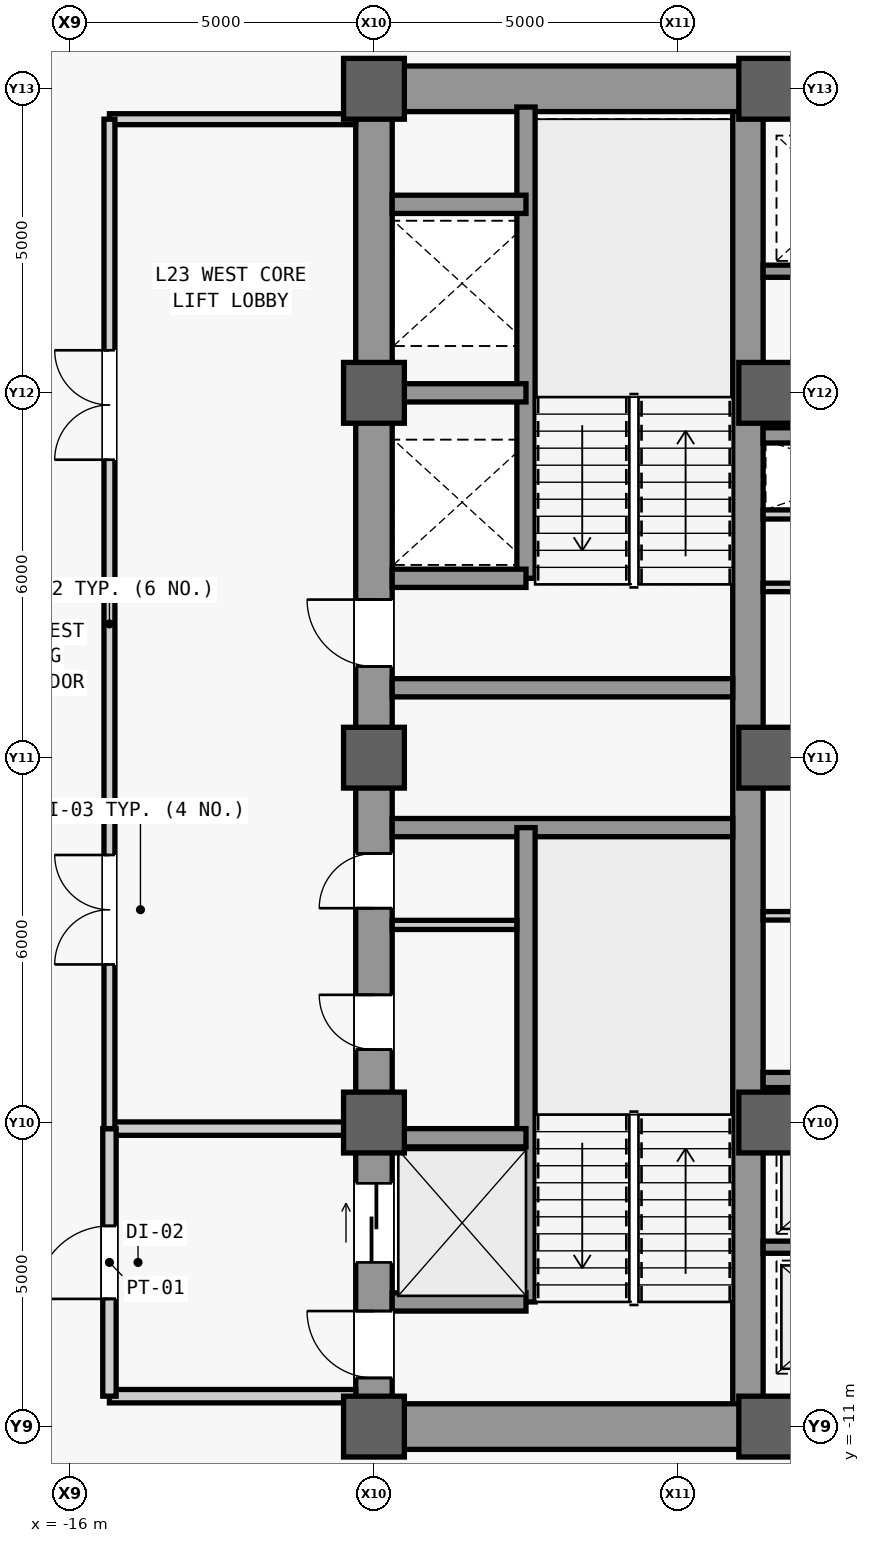
"""IFC4 building model, lengths in metres.
Left out: names, types, materials, properties, quantities, classifications, styles, units other than length and angle.
Written with IfcOpenShell. Run it as: python <this file> out.ifc"""

import sys

from ifc_helpers import new_model, si_unit, direction, frame, frame_2d, origin, origin_2d, place, context, subcontext, project, spatial, rectangle, extrude, source, transform, mapped, element, fill, save


model = new_model("IFC4")
c1 = context("Model", 3, precision=1e-05, world=origin(), true_north=direction((0.0, 1.0)))
c2 = subcontext(c1, "Body", "Model", "MODEL_VIEW")
j1 = project(units=[si_unit("LENGTHUNIT", "METRE"), si_unit("PLANEANGLEUNIT", "RADIAN")], contexts=[c1])
p1 = place(None, origin())
s1 = spatial("IfcSite", under=j1, at=p1, CompositionType="ELEMENT")
p2 = place(p1, origin())
s2 = spatial("IfcBuilding", under=s1, at=p2, CompositionType="ELEMENT")
p3 = place(p2, frame((0.0, 0.0, 103.7)))
s3 = spatial("IfcBuildingStorey", under=s2, at=p3, CompositionType="ELEMENT", Elevation=103.7)
m1 = source(origin(), c2, "Body", "SweptSolid", [
    extrude(rectangle(XDim=22.0, YDim=0.6, at=frame_2d((11.0, 0.0))), origin(), (0.0, 0.0, 1.0), 3.84),
])
p4 = place(p3, frame((-11.0, -11.0, 0.0), z_axis=(0.0, 0.0, 1.0), x_axis=(0.0, 1.0, 0.0)))
e1 = element("IfcWall", 1, at=p4, inside=s3, PredefinedType="SHEAR", context=c2, shape_type="MappedRepresentation", body=[
    mapped(m1, transform((0.0, 0.0, 0.0), scale=1.0)),
])
m2 = source(origin(), c2, "Body", "SweptSolid", [
    extrude(rectangle(XDim=1.1, YDim=2.2, at=frame_2d((0.55, 1.1))), frame((0.0, 0.31, 0.0), z_axis=(0.0, -1.0, 0.0), x_axis=(1.0, 0.0, 0.0)), (0.0, 0.0, 1.0), 0.62),
])
p5 = place(p4, frame((0.8, 0.0, 0.0)))
e2 = element("IfcOpeningElement", 2, at=p5, cuts=e1, PredefinedType="OPENING", context=c2, shape_type="MappedRepresentation", body=[
    mapped(m2, transform((0.0, 0.0, 0.0), scale=1.0)),
])
p6 = place(p4, frame((12.5, 0.0, 0.0)))
e3 = element("IfcOpeningElement", 3, at=p6, cuts=e1, PredefinedType="OPENING", context=c2, shape_type="MappedRepresentation", body=[
    mapped(m2, transform((0.0, 0.0, 0.0), scale=1.0)),
])
m3 = source(origin(), c2, "Body", "SweptSolid", [
    extrude(rectangle(XDim=0.9, YDim=2.15, at=frame_2d((0.45, 1.075))), frame((0.0, 0.31, 0.0), z_axis=(0.0, -1.0, 0.0), x_axis=(1.0, 0.0, 0.0)), (0.0, 0.0, 1.0), 0.62),
])
p7 = place(p4, frame((6.2, 0.0, 0.0)))
e4 = element("IfcOpeningElement", 4, at=p7, cuts=e1, PredefinedType="OPENING", context=c2, shape_type="MappedRepresentation", body=[
    mapped(m3, transform((0.0, 0.0, 0.0), scale=1.0)),
])
p8 = place(p4, frame((8.525, 0.0, 0.0)))
e5 = element("IfcOpeningElement", 5, at=p8, cuts=e1, PredefinedType="OPENING", context=c2, shape_type="MappedRepresentation", body=[
    mapped(m3, transform((0.0, 0.0, 0.0), scale=1.0)),
])
m4 = source(origin(), c2, "Body", "SweptSolid", [
    extrude(rectangle(XDim=1.3, YDim=2.3, at=frame_2d((0.65, 1.15))), frame((0.0, 0.31, 0.0), z_axis=(0.0, -1.0, 0.0), x_axis=(1.0, 0.0, 0.0)), (0.0, 0.0, 1.0), 0.62),
])
p9 = place(p4, frame((2.7, 0.0, 0.0)))
e6 = element("IfcOpeningElement", 6, at=p9, cuts=e1, PredefinedType="OPENING", context=c2, shape_type="MappedRepresentation", body=[
    mapped(m4, transform((0.0, 0.0, 0.0), scale=1.0)),
])
m5 = source(origin(), c2, "Body", "SweptSolid", [
    extrude(rectangle(XDim=21.4, YDim=0.5, at=frame_2d((10.7, 0.0))), origin(), (0.0, 0.0, 1.0), 3.84),
])
p10 = place(p3, frame((-4.85, -10.7, 0.0), z_axis=(0.0, 0.0, 1.0), x_axis=(0.0, 1.0, 0.0)))
e7 = element("IfcWall", 7, at=p10, inside=s3, PredefinedType="SHEAR", context=c2, shape_type="MappedRepresentation", body=[
    mapped(m5, transform((0.0, 0.0, 0.0), scale=1.0)),
])
m6 = source(origin(), c2, "Body", "SweptSolid", [
    extrude(rectangle(XDim=5.85, YDim=0.75, at=frame_2d((2.925, 0.0))), origin(), (0.0, 0.0, 1.0), 3.84),
])
for number, where, z_axis, x_axis in (
    (8, (-10.7, -11.0, 0.0), (0.0, 0.0, 1.0), (1.0, 0.0, 0.0)),
    (9, (-10.7, 11.0, 0.0), (0.0, 0.0, 1.0), (1.0, 0.0, 0.0)),
):
    element("IfcWall", number, at=place(p3, frame(where, z_axis=z_axis, x_axis=x_axis)), inside=s3, PredefinedType="SHEAR", context=c2, shape_type="MappedRepresentation", body=[
        mapped(m6, transform((0.0, 0.0, 0.0), scale=1.0)),
    ])
m7 = source(origin(), c2, "Body", "SweptSolid", [
    extrude(rectangle(XDim=5.6, YDim=0.3, at=frame_2d((2.8, 0.0))), origin(), (0.0, 0.0, 1.0), 3.84),
])
for number, where, z_axis, x_axis in (
    (10, (-10.7, -1.15, 0.0), (0.0, 0.0, 1.0), (1.0, 0.0, 0.0)),
    (11, (-10.7, 1.15, 0.0), (0.0, 0.0, 1.0), (1.0, 0.0, 0.0)),
):
    element("IfcWall", number, at=place(p3, frame(where, z_axis=z_axis, x_axis=x_axis)), inside=s3, PredefinedType="SHEAR", context=c2, shape_type="MappedRepresentation", body=[
        mapped(m7, transform((0.0, 0.0, 0.0), scale=1.0)),
    ])
m8 = source(origin(), c2, "Body", "SweptSolid", [
    extrude(rectangle(XDim=9.2, YDim=0.5, at=frame_2d((4.6, 0.0))), origin(), (0.0, 0.0, 1.0), 3.84),
])
p11 = place(p3, frame((-4.6, -11.0, 0.0), z_axis=(0.0, 0.0, 1.0), x_axis=(1.0, 0.0, 0.0)))
e12 = element("IfcWall", 12, at=p11, inside=s3, PredefinedType="SHEAR", context=c2, shape_type="MappedRepresentation", body=[
    mapped(m8, transform((0.0, 0.0, 0.0), scale=1.0)),
])
m9 = source(origin(), c2, "Body", "SweptSolid", [
    extrude(rectangle(XDim=1.8, YDim=2.25, at=frame_2d((0.9, 1.125))), frame((0.0, 0.26, 0.0), z_axis=(0.0, -1.0, 0.0), x_axis=(1.0, 0.0, 0.0)), (0.0, 0.0, 1.0), 0.52),
])
p12 = place(p11, frame((3.7, 0.0, 0.0)))
e13 = element("IfcOpeningElement", 13, at=p12, cuts=e12, PredefinedType="OPENING", context=c2, shape_type="MappedRepresentation", body=[
    mapped(m9, transform((0.0, 0.0, 0.0), scale=1.0)),
])
p13 = place(p3, frame((-4.6, 11.0, 0.0), z_axis=(0.0, 0.0, 1.0), x_axis=(1.0, 0.0, 0.0)))
e14 = element("IfcWall", 14, at=p13, inside=s3, PredefinedType="SHEAR", context=c2, shape_type="MappedRepresentation", body=[
    mapped(m8, transform((0.0, 0.0, 0.0), scale=1.0)),
])
p14 = place(p13, frame((3.7, 0.0, 0.0)))
e15 = element("IfcOpeningElement", 15, at=p14, cuts=e14, PredefinedType="OPENING", context=c2, shape_type="MappedRepresentation", body=[
    mapped(m9, transform((0.0, 0.0, 0.0), scale=1.0)),
])
m10 = source(origin(), c2, "Body", "SweptSolid", [
    extrude(rectangle(XDim=1.0, YDim=1.0, at=origin_2d()), origin(), (0.0, 0.0, 1.0), 4.1),
])
for number, where, z_axis, x_axis in (
    (16, (-11.0, -11.0, 0.0), (0.0, 0.0, 1.0), (1.0, 0.0, 0.0)),
    (17, (-11.0, -6.0, 0.0), (0.0, 0.0, 1.0), (1.0, 0.0, 0.0)),
    (18, (-11.0, 0.0, 0.0), (0.0, 0.0, 1.0), (1.0, 0.0, 0.0)),
    (19, (-11.0, 6.0, 0.0), (0.0, 0.0, 1.0), (1.0, 0.0, 0.0)),
    (20, (-11.0, 11.0, 0.0), (0.0, 0.0, 1.0), (1.0, 0.0, 0.0)),
    (21, (-4.5, -11.0, 0.0), (0.0, 0.0, 1.0), (1.0, 0.0, 0.0)),
    (22, (-4.5, -6.0, 0.0), (0.0, 0.0, 1.0), (1.0, 0.0, 0.0)),
    (23, (-4.5, 0.0, 0.0), (0.0, 0.0, 1.0), (1.0, 0.0, 0.0)),
    (24, (-4.5, 6.0, 0.0), (0.0, 0.0, 1.0), (1.0, 0.0, 0.0)),
    (25, (-4.5, 11.0, 0.0), (0.0, 0.0, 1.0), (1.0, 0.0, 0.0)),
):
    element("IfcColumn", number, at=place(p3, frame(where, z_axis=z_axis, x_axis=x_axis)), inside=s3, PredefinedType="COLUMN", context=c2, shape_type="MappedRepresentation", body=[
        mapped(m10, transform((0.0, 0.0, 0.0), scale=1.0)),
    ])
m11 = source(origin(), c2, "Body", "SweptSolid", [
    extrude(rectangle(XDim=7.8, YDim=0.3, at=frame_2d((3.9, 0.0))), origin(), (0.0, 0.0, 1.0), 3.84),
])
p15 = place(p3, frame((-8.5, -8.95, 0.0), z_axis=(0.0, 0.0, 1.0), x_axis=(0.0, 1.0, 0.0)))
e26 = element("IfcWall", 26, at=p15, inside=s3, PredefinedType="SHEAR", context=c2, shape_type="MappedRepresentation", body=[
    mapped(m11, transform((0.0, 0.0, 0.0), scale=1.0)),
])
m12 = source(origin(), c2, "Body", "SweptSolid", [
    extrude(rectangle(XDim=2.2, YDim=0.3, at=frame_2d((1.1, 0.0))), origin(), (0.0, 0.0, 1.0), 3.84),
])
for number, where, z_axis, x_axis in (
    (27, (-10.7, -8.95, 0.0), (0.0, 0.0, 1.0), (1.0, 0.0, 0.0)),
    (28, (-10.7, -6.25, 0.0), (0.0, 0.0, 1.0), (1.0, 0.0, 0.0)),
):
    element("IfcWall", number, at=place(p3, frame(where, z_axis=z_axis, x_axis=x_axis)), inside=s3, PredefinedType="SHEAR", context=c2, shape_type="MappedRepresentation", body=[
        mapped(m12, transform((0.0, 0.0, 0.0), scale=1.0)),
    ])
m13 = source(origin(), c2, "Body", "SweptSolid", [
    extrude(rectangle(XDim=7.75, YDim=0.3, at=frame_2d((3.875, 0.0))), origin(), (0.0, 0.0, 1.0), 3.84),
])
p16 = place(p3, frame((-8.5, 2.95, 0.0), z_axis=(0.0, 0.0, 1.0), x_axis=(0.0, 1.0, 0.0)))
e29 = element("IfcWall", 29, at=p16, inside=s3, PredefinedType="SHEAR", context=c2, shape_type="MappedRepresentation", body=[
    mapped(m13, transform((0.0, 0.0, 0.0), scale=1.0)),
])
for number, where, z_axis, x_axis in (
    (30, (-10.7, 2.95, 0.0), (0.0, 0.0, 1.0), (1.0, 0.0, 0.0)),
    (31, (-10.7, 6.0, 0.0), (0.0, 0.0, 1.0), (1.0, 0.0, 0.0)),
    (32, (-10.7, 9.1, 0.0), (0.0, 0.0, 1.0), (1.0, 0.0, 0.0)),
):
    element("IfcWall", number, at=place(p3, frame(where, z_axis=z_axis, x_axis=x_axis)), inside=s3, PredefinedType="SHEAR", context=c2, shape_type="MappedRepresentation", body=[
        mapped(m12, transform((0.0, 0.0, 0.0), scale=1.0)),
    ])
m14 = source(origin(), c2, "Body", "SweptSolid", [
    extrude(rectangle(XDim=2.05, YDim=0.15, at=frame_2d((1.025, 0.0))), origin(), (0.0, 0.0, 1.0), 3.84),
])
p17 = place(p3, frame((-10.7, -2.75, 0.0), z_axis=(0.0, 0.0, 1.0), x_axis=(1.0, 0.0, 0.0)))
e33 = element("IfcWall", 33, at=p17, inside=s3, PredefinedType="PARTITIONING", context=c2, shape_type="MappedRepresentation", body=[
    mapped(m14, transform((0.0, 0.0, 0.0), scale=1.0)),
])
m15 = source(origin(), c2, "Body", "SweptSolid", [
    extrude(rectangle(XDim=4.05, YDim=0.22, at=frame_2d((2.025, 0.0))), origin(), (0.0, 0.0, 1.0), 3.84),
])
p18 = place(p3, frame((-15.35, -10.5, 0.0), z_axis=(0.0, 0.0, 1.0), x_axis=(1.0, 0.0, 0.0)))
e34 = element("IfcWall", 34, at=p18, inside=s3, PredefinedType="PARTITIONING", context=c2, shape_type="MappedRepresentation", body=[
    mapped(m15, transform((0.0, 0.0, 0.0), scale=1.0)),
])
m16 = source(origin(), c2, "Body", "SweptSolid", [
    extrude(rectangle(XDim=4.05, YDim=0.22, at=frame_2d((2.025, 0.0))), origin(), (0.0, 0.0, 1.0), 3.067),
])
p19 = place(p3, frame((-15.35, -6.1, 0.0), z_axis=(0.0, 0.0, 1.0), x_axis=(1.0, 0.0, 0.0)))
e35 = element("IfcWall", 35, at=p19, inside=s3, PredefinedType="PARTITIONING", context=c2, shape_type="MappedRepresentation", body=[
    mapped(m16, transform((0.0, 0.0, 0.0), scale=1.0)),
])
m17 = source(origin(), c2, "Body", "SweptSolid", [
    extrude(rectangle(XDim=4.4, YDim=0.22, at=frame_2d((2.2, 0.0))), origin(), (0.0, 0.0, 1.0), 3.84),
])
p20 = place(p3, frame((-15.35, -10.5, 0.0), z_axis=(0.0, 0.0, 1.0), x_axis=(0.0, 1.0, 0.0)))
e36 = element("IfcWall", 36, at=p20, inside=s3, PredefinedType="PARTITIONING", context=c2, shape_type="MappedRepresentation", body=[
    mapped(m17, transform((0.0, 0.0, 0.0), scale=1.0)),
])
m18 = source(origin(), c2, "Body", "SweptSolid", [
    extrude(rectangle(XDim=1.2, YDim=2.2, at=frame_2d((0.6, 1.1))), frame((0.0, 0.12, 0.0), z_axis=(0.0, -1.0, 0.0), x_axis=(1.0, 0.0, 0.0)), (0.0, 0.0, 1.0), 0.24),
])
p21 = place(p20, frame((1.6, 0.0, 0.0)))
e37 = element("IfcOpeningElement", 37, at=p21, cuts=e36, PredefinedType="OPENING", context=c2, shape_type="MappedRepresentation", body=[
    mapped(m18, transform((0.0, 0.0, 0.0), scale=1.0)),
])
m19 = source(origin(), c2, "Body", "SweptSolid", [
    extrude(rectangle(XDim=4.05, YDim=0.18, at=frame_2d((2.025, 0.0))), origin(), (0.0, 0.0, 1.0), 3.84),
])
p22 = place(p3, frame((-15.35, 10.5, 0.0), z_axis=(0.0, 0.0, 1.0), x_axis=(1.0, 0.0, 0.0)))
e38 = element("IfcWall", 38, at=p22, inside=s3, PredefinedType="PARTITIONING", context=c2, shape_type="MappedRepresentation", body=[
    mapped(m19, transform((0.0, 0.0, 0.0), scale=1.0)),
])
m20 = source(origin(), c2, "Body", "SweptSolid", [
    extrude(rectangle(XDim=16.6, YDim=0.18, at=frame_2d((8.3, 0.0))), origin(), (0.0, 0.0, 1.0), 3.84),
])
p23 = place(p3, frame((-15.35, -6.1, 0.0), z_axis=(0.0, 0.0, 1.0), x_axis=(0.0, 1.0, 0.0)))
e39 = element("IfcWall", 39, at=p23, inside=s3, PredefinedType="PARTITIONING", context=c2, shape_type="MappedRepresentation", body=[
    mapped(m20, transform((0.0, 0.0, 0.0), scale=1.0)),
])
m21 = source(origin(), c2, "Body", "SweptSolid", [
    extrude(rectangle(XDim=1.8, YDim=2.25, at=frame_2d((0.9, 1.125))), frame((0.0, 0.1, 0.0), z_axis=(0.0, -1.0, 0.0), x_axis=(1.0, 0.0, 0.0)), (0.0, 0.0, 1.0), 0.2),
])
p24 = place(p23, frame((2.7, 0.0, 0.0)))
e40 = element("IfcOpeningElement", 40, at=p24, cuts=e39, PredefinedType="OPENING", context=c2, shape_type="MappedRepresentation", body=[
    mapped(m21, transform((0.0, 0.0, 0.0), scale=1.0)),
])
p25 = place(p23, frame((11.0, 0.0, 0.0)))
e41 = element("IfcOpeningElement", 41, at=p25, cuts=e39, PredefinedType="OPENING", context=c2, shape_type="MappedRepresentation", body=[
    mapped(m21, transform((0.0, 0.0, 0.0), scale=1.0)),
])
m22 = source(origin(), c2, "Body", "SweptSolid", [
    extrude(rectangle(XDim=3.45, YDim=0.15, at=frame_2d((1.725, 0.0))), origin(), (0.0, 0.0, 1.0), 3.84),
])
p26 = place(p3, frame((-4.6, 4.0, 0.0), z_axis=(0.0, 0.0, 1.0), x_axis=(1.0, 0.0, 0.0)))
e42 = element("IfcWall", 42, at=p26, inside=s3, PredefinedType="PARTITIONING", context=c2, shape_type="MappedRepresentation", body=[
    mapped(m22, transform((0.0, 0.0, 0.0), scale=1.0)),
])
m23 = source(origin(), c2, "Body", "SweptSolid", [
    extrude(rectangle(XDim=2.45, YDim=0.2, at=frame_2d((1.225, 0.0))), origin(), (0.0, 0.0, 1.0), 3.84),
])
p27 = place(p3, frame((-4.6, -8.05, 0.0), z_axis=(0.0, 0.0, 1.0), x_axis=(1.0, 0.0, 0.0)))
e43 = element("IfcWall", 43, at=p27, inside=s3, PredefinedType="SHEAR", context=c2, shape_type="MappedRepresentation", body=[
    mapped(m23, transform((0.0, 0.0, 0.0), scale=1.0)),
])
m24 = source(origin(), c2, "Body", "SweptSolid", [
    extrude(rectangle(XDim=9.2, YDim=0.25, at=frame_2d((4.6, 0.0))), origin(), (0.0, 0.0, 1.0), 3.84),
])
p28 = place(p3, frame((-4.6, -5.3, 0.0), z_axis=(0.0, 0.0, 1.0), x_axis=(1.0, 0.0, 0.0)))
e44 = element("IfcWall", 44, at=p28, inside=s3, PredefinedType="SHEAR", context=c2, shape_type="MappedRepresentation", body=[
    mapped(m24, transform((0.0, 0.0, 0.0), scale=1.0)),
])
m25 = source(origin(), c2, "Body", "SweptSolid", [
    extrude(rectangle(XDim=1.05, YDim=2.2, at=frame_2d((0.525, 1.1))), frame((0.0, 0.135, 0.0), z_axis=(0.0, -1.0, 0.0), x_axis=(1.0, 0.0, 0.0)), (0.0, 0.0, 1.0), 0.27),
])
p29 = place(p28, frame((4.075, 0.0, 0.0)))
e45 = element("IfcOpeningElement", 45, at=p29, cuts=e44, PredefinedType="OPENING", context=c2, shape_type="MappedRepresentation", body=[
    mapped(m25, transform((0.0, 0.0, 0.0), scale=1.0)),
])
p30 = place(p3, frame((-4.6, 8.0, 0.0), z_axis=(0.0, 0.0, 1.0), x_axis=(1.0, 0.0, 0.0)))
e46 = element("IfcWall", 46, at=p30, inside=s3, PredefinedType="SHEAR", context=c2, shape_type="MappedRepresentation", body=[
    mapped(m23, transform((0.0, 0.0, 0.0), scale=1.0)),
])
p31 = place(p3, frame((-4.6, 5.3, 0.0), z_axis=(0.0, 0.0, 1.0), x_axis=(1.0, 0.0, 0.0)))
e47 = element("IfcWall", 47, at=p31, inside=s3, PredefinedType="SHEAR", context=c2, shape_type="MappedRepresentation", body=[
    mapped(m24, transform((0.0, 0.0, 0.0), scale=1.0)),
])
p32 = place(p31, frame((4.075, 0.0, 0.0)))
e48 = element("IfcOpeningElement", 48, at=p32, cuts=e47, PredefinedType="OPENING", context=c2, shape_type="MappedRepresentation", body=[
    mapped(m25, transform((0.0, 0.0, 0.0), scale=1.0)),
])
m26 = source(origin(), c2, "Body", "SweptSolid", [
    extrude(rectangle(XDim=3.45, YDim=0.14, at=frame_2d((1.725, 0.0))), origin(), (0.0, 0.0, 1.0), 3.84),
])
p33 = place(p3, frame((-4.6, -2.6, 0.0), z_axis=(0.0, 0.0, 1.0), x_axis=(1.0, 0.0, 0.0)))
e49 = element("IfcWall", 49, at=p33, inside=s3, PredefinedType="PARTITIONING", context=c2, shape_type="MappedRepresentation", body=[
    mapped(m26, transform((0.0, 0.0, 0.0), scale=1.0)),
])
m27 = source(origin(), c2, "Body", "SweptSolid", [
    extrude(rectangle(XDim=3.45, YDim=0.14, at=frame_2d((1.725, 0.0))), origin(), (0.0, 0.0, 1.0), 3.145),
])
p34 = place(p3, frame((-4.6, 0.2, 0.0), z_axis=(0.0, 0.0, 1.0), x_axis=(1.0, 0.0, 0.0)))
e50 = element("IfcWall", 50, at=p34, inside=s3, PredefinedType="PARTITIONING", context=c2, shape_type="MappedRepresentation", body=[
    mapped(m27, transform((0.0, 0.0, 0.0), scale=1.0)),
])
p35 = place(p3, frame((-4.6, 2.8, 0.0), z_axis=(0.0, 0.0, 1.0), x_axis=(1.0, 0.0, 0.0)))
e51 = element("IfcWall", 51, at=p35, inside=s3, PredefinedType="PARTITIONING", context=c2, shape_type="MappedRepresentation", body=[
    mapped(m26, transform((0.0, 0.0, 0.0), scale=1.0)),
])
m28 = source(origin(), c2, "Body", "SweptSolid", [
    extrude(rectangle(XDim=1.1, YDim=2.2, at=frame_2d((0.55, 1.1))), frame((0.0, 0.025, 0.0), z_axis=(0.0, -1.0, 0.0), x_axis=(1.0, 0.0, 0.0)), (0.0, 0.0, 1.0), 0.05),
])
p36 = place(p5, origin())
e52 = element("IfcDoor", 52, at=p36, inside=s3, OperationType="SINGLE_SWING_RIGHT", PredefinedType="DOOR", context=c2, shape_type="MappedRepresentation", body=[
    mapped(m28, transform((0.0, 0.0, 0.0), scale=1.0)),
])
fill(e2, e52)
p37 = place(p6, origin())
e53 = element("IfcDoor", 53, at=p37, inside=s3, OperationType="SINGLE_SWING_RIGHT", PredefinedType="DOOR", context=c2, shape_type="MappedRepresentation", body=[
    mapped(m28, transform((0.0, 0.0, 0.0), scale=1.0)),
])
fill(e3, e53)
m29 = source(origin(), c2, "Body", "SweptSolid", [
    extrude(rectangle(XDim=0.9, YDim=2.15, at=frame_2d((0.45, 1.075))), frame((0.0, 0.025, 0.0), z_axis=(0.0, -1.0, 0.0), x_axis=(1.0, 0.0, 0.0)), (0.0, 0.0, 1.0), 0.05),
])
p38 = place(p7, origin())
e54 = element("IfcDoor", 54, at=p38, inside=s3, OperationType="SINGLE_SWING_RIGHT", PredefinedType="DOOR", context=c2, shape_type="MappedRepresentation", body=[
    mapped(m29, transform((0.0, 0.0, 0.0), scale=1.0)),
])
fill(e4, e54)
p39 = place(p8, origin())
e55 = element("IfcDoor", 55, at=p39, inside=s3, OperationType="SINGLE_SWING_LEFT", PredefinedType="DOOR", context=c2, shape_type="MappedRepresentation", body=[
    mapped(m29, transform((0.0, 0.0, 0.0), scale=1.0)),
])
fill(e5, e55)
m30 = source(origin(), c2, "Body", "SweptSolid", [
    extrude(rectangle(XDim=1.2, YDim=2.2, at=frame_2d((0.6, 1.1))), frame((0.0, 0.025, 0.0), z_axis=(0.0, -1.0, 0.0), x_axis=(1.0, 0.0, 0.0)), (0.0, 0.0, 1.0), 0.05),
])
p40 = place(p21, origin())
e56 = element("IfcDoor", 56, at=p40, inside=s3, OperationType="SINGLE_SWING_LEFT", PredefinedType="DOOR", context=c2, shape_type="MappedRepresentation", body=[
    mapped(m30, transform((0.0, 0.0, 0.0), scale=1.0)),
])
fill(e37, e56)
m31 = source(origin(), c2, "Body", "SweptSolid", [
    extrude(rectangle(XDim=1.8, YDim=2.25, at=frame_2d((0.9, 1.125))), frame((0.0, 0.025, 0.0), z_axis=(0.0, -1.0, 0.0), x_axis=(1.0, 0.0, 0.0)), (0.0, 0.0, 1.0), 0.05),
])
p41 = place(p24, origin())
e57 = element("IfcDoor", 57, at=p41, inside=s3, OperationType="SINGLE_SWING_LEFT", PredefinedType="DOOR", context=c2, shape_type="MappedRepresentation", body=[
    mapped(m31, transform((0.0, 0.0, 0.0), scale=1.0)),
])
fill(e40, e57)
p42 = place(p25, origin())
e58 = element("IfcDoor", 58, at=p42, inside=s3, OperationType="SINGLE_SWING_RIGHT", PredefinedType="DOOR", context=c2, shape_type="MappedRepresentation", body=[
    mapped(m31, transform((0.0, 0.0, 0.0), scale=1.0)),
])
fill(e41, e58)
m32 = source(origin(), c2, "Body", "SweptSolid", [
    extrude(rectangle(XDim=1.3, YDim=2.3, at=frame_2d((0.65, 1.15))), frame((0.0, 0.025, 0.0), z_axis=(0.0, -1.0, 0.0), x_axis=(1.0, 0.0, 0.0)), (0.0, 0.0, 1.0), 0.05),
])
p43 = place(p9, origin())
e59 = element("IfcDoor", 59, at=p43, inside=s3, OperationType="SLIDING_TO_LEFT", PredefinedType="DOOR", context=c2, shape_type="MappedRepresentation", body=[
    mapped(m32, transform((0.0, 0.0, 0.0), scale=1.0)),
])
fill(e6, e59)
save(model, sys.argv[1])
